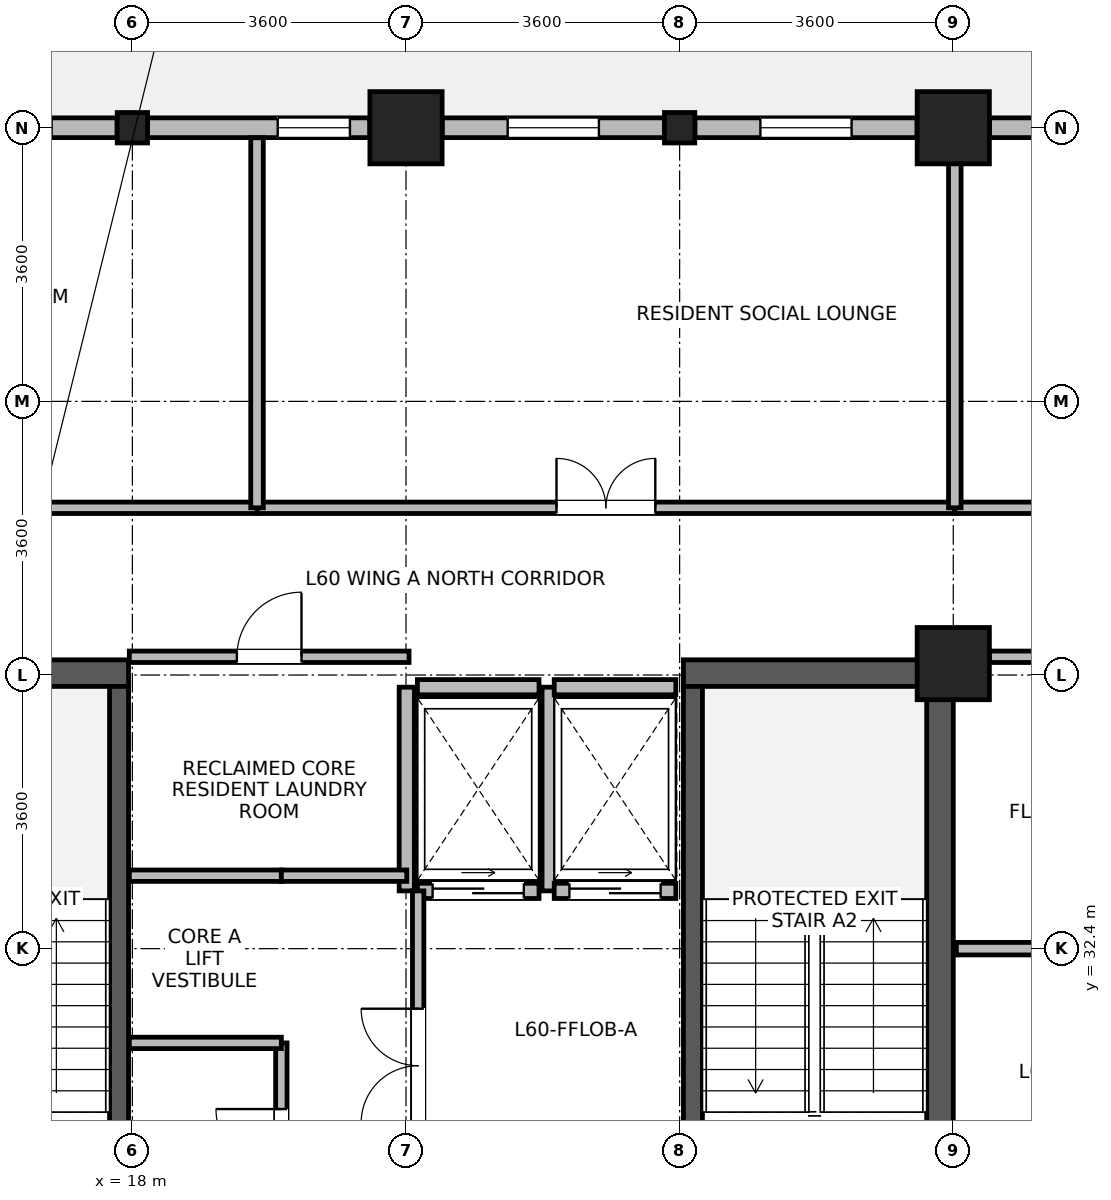
"""IFC4 building model, lengths in metres.
Left out: names, types, materials, properties, quantities, classifications, styles, units other than length and angle.
Written with IfcOpenShell. Run it as: python <this file> out.ifc"""

import sys

from ifc_helpers import new_model, si_unit, direction, frame, frame_2d, origin, origin_2d, place, context, subcontext, project, spatial, rectangle, i_section, extrude, source, transform, mapped, element, fill, save


model = new_model("IFC4")
c1 = context("Model", 3, precision=1e-05, world=origin(), true_north=direction((0.0, 1.0)))
c2 = subcontext(c1, "Body", "Model", "MODEL_VIEW")
j1 = project(units=[si_unit("LENGTHUNIT", "METRE"), si_unit("PLANEANGLEUNIT", "RADIAN")], contexts=[c1])
p1 = place(None, origin())
s1 = spatial("IfcSite", under=j1, at=p1, CompositionType="ELEMENT")
p2 = place(p1, origin())
s2 = spatial("IfcBuilding", under=s1, at=p2, CompositionType="ELEMENT")
p3 = place(p2, frame((0.0, 0.0, 235.1)))
s3 = spatial("IfcBuildingStorey", under=s2, at=p3, CompositionType="ELEMENT", Elevation=235.1)
p4 = place(p3, frame((28.625, 28.5, 0.0), z_axis=(0.0, 0.0, 1.0), x_axis=(0.0, 1.0, 0.0)))
e1 = element("IfcWall", 1, at=p4, inside=s3, PredefinedType="SHEAR", context=c2, shape_type="SweptSolid", body=[
    extrude(rectangle(XDim=7.7, YDim=0.35, at=frame_2d((3.85, 0.0))), origin(), (0.0, 0.0, 1.0), 3.44),
])
for number, where, z_axis, x_axis in (
    (2, (14.75, 36.025, 0.0), (0.0, 0.0, 1.0), (1.0, 0.0, 0.0)),
    (3, (25.25, 36.025, 0.0), (0.0, 0.0, 1.0), (1.0, 0.0, 0.0)),
):
    element("IfcWall", number, at=place(p3, frame(where, z_axis=z_axis, x_axis=x_axis)), inside=s3, PredefinedType="SHEAR", context=c2, shape_type="SweptSolid", body=[
        extrude(rectangle(XDim=3.2, YDim=0.35, at=frame_2d((1.6, 0.0))), origin(), (0.0, 0.0, 1.0), 3.44),
    ])
p5 = place(p3, frame((17.825, 28.85, 0.0), z_axis=(0.0, 0.0, 1.0), x_axis=(0.0, 1.0, 0.0)))
e4 = element("IfcWall", 4, at=p5, inside=s3, PredefinedType="SHEAR", context=c2, shape_type="SweptSolid", body=[
    extrude(rectangle(XDim=7.0, YDim=0.25, at=frame_2d((3.5, 0.0))), origin(), (0.0, 0.0, 1.0), 3.44),
])
p6 = place(p5, frame((0.15, 0.0, 0.0)))
e5 = element("IfcOpeningElement", 5, at=p6, cuts=e4, PredefinedType="OPENING", context=c2, shape_type="SweptSolid", body=[
    extrude(rectangle(XDim=1.1, YDim=2.08, at=frame_2d((0.55, 1.04))), frame((0.0, 0.135, 0.0), z_axis=(0.0, -1.0, 0.0), x_axis=(1.0, 0.0, 0.0)), (0.0, 0.0, 1.0), 0.27),
])
p7 = place(p3, frame((25.375, 28.85, 0.0), z_axis=(0.0, 0.0, 1.0), x_axis=(0.0, 1.0, 0.0)))
e6 = element("IfcWall", 6, at=p7, inside=s3, PredefinedType="SHEAR", context=c2, shape_type="SweptSolid", body=[
    extrude(rectangle(XDim=7.0, YDim=0.25, at=frame_2d((3.5, 0.0))), origin(), (0.0, 0.0, 1.0), 3.44),
])
p8 = place(p7, frame((0.15, 0.0, 0.0)))
e7 = element("IfcOpeningElement", 7, at=p8, cuts=e6, PredefinedType="OPENING", context=c2, shape_type="SweptSolid", body=[
    extrude(rectangle(XDim=1.1, YDim=2.08, at=frame_2d((0.55, 1.04))), frame((0.0, 0.135, 0.0), z_axis=(0.0, -1.0, 0.0), x_axis=(1.0, 0.0, 0.0)), (0.0, 0.0, 1.0), 0.27),
])
m1 = source(origin(), c2, "Body", "SweptSolid", [
    extrude(rectangle(XDim=0.95, YDim=0.95, at=origin_2d()), origin(), (0.0, 0.0, 1.0), 3.7),
])
for number, where, z_axis, x_axis in (
    (8, (21.6, 43.2, 0.0), (0.0, 0.0, 1.0), (1.0, 0.0, 0.0)),
    (9, (28.8, 36.15, 0.0), (0.0, 0.0, 1.0), (1.0, 0.0, 0.0)),
    (10, (28.8, 43.2, 0.0), (0.0, 0.0, 1.0), (1.0, 0.0, 0.0)),
):
    element("IfcColumn", number, at=place(p3, frame(where, z_axis=z_axis, x_axis=x_axis)), inside=s3, PredefinedType="COLUMN", context=c2, shape_type="MappedRepresentation", body=[
        mapped(m1, transform((0.0, 0.0, 0.0), x_axis=(1.0, 0.0, 0.0), y_axis=(0.0, 1.0, 0.0), z_axis=(0.0, 0.0, 1.0), scale=1.0)),
    ])
m2 = source(origin(), c2, "Body", "SweptSolid", [
    extrude(i_section(OverallWidth=0.399, OverallDepth=0.4, WebThickness=0.017, FlangeThickness=0.023, FilletRadius=0.015, at=origin_2d()), origin(), (0.0, 0.0, 1.0), 3.7),
])
for number, where, z_axis, x_axis in (
    (11, (18.0, 43.2, 0.0), (0.0, 0.0, 1.0), (1.0, 0.0, 0.0)),
    (12, (25.2, 43.2, 0.0), (0.0, 0.0, 1.0), (1.0, 0.0, 0.0)),
):
    element("IfcColumn", number, at=place(p3, frame(where, z_axis=z_axis, x_axis=x_axis)), inside=s3, PredefinedType="COLUMN", context=c2, shape_type="MappedRepresentation", body=[
        mapped(m2, transform((0.0, 0.0, 0.0), x_axis=(1.0, 0.0, 0.0), y_axis=(0.0, 1.0, 0.0), z_axis=(0.0, 0.0, 1.0), scale=1.0)),
    ])
p9 = place(p3, frame((29.276, 43.2, 0.0), z_axis=(0.0, 0.0, 1.0), x_axis=(1.0, 0.0, 0.0)))
e13 = element("IfcWall", 13, at=p9, inside=s3, PredefinedType="STANDARD", context=c2, shape_type="SweptSolid", body=[
    extrude(rectangle(XDim=2.924, YDim=0.26, at=frame_2d((1.462, 0.0))), origin(), (0.0, 0.0, 1.0), 3.02),
])
p10 = place(p9, frame((0.862, 0.0, 0.85)))
e14 = element("IfcOpeningElement", 14, at=p10, cuts=e13, PredefinedType="OPENING", context=c2, shape_type="SweptSolid", body=[
    extrude(rectangle(XDim=1.2, YDim=1.75, at=frame_2d((0.6, 0.875))), frame((0.0, 0.14, 0.0), z_axis=(0.0, -1.0, 0.0), x_axis=(1.0, 0.0, 0.0)), (0.0, 0.0, 1.0), 0.28),
])
p11 = place(p3, frame((25.4, 43.2, 0.0), z_axis=(0.0, 0.0, 1.0), x_axis=(1.0, 0.0, 0.0)))
e15 = element("IfcWall", 15, at=p11, inside=s3, PredefinedType="STANDARD", context=c2, shape_type="SweptSolid", body=[
    extrude(rectangle(XDim=2.924, YDim=0.26, at=frame_2d((1.462, 0.0))), origin(), (0.0, 0.0, 1.0), 3.02),
])
p12 = place(p11, frame((0.862, 0.0, 0.85)))
e16 = element("IfcOpeningElement", 16, at=p12, cuts=e15, PredefinedType="OPENING", context=c2, shape_type="SweptSolid", body=[
    extrude(rectangle(XDim=1.2, YDim=1.75, at=frame_2d((0.6, 0.875))), frame((0.0, 0.14, 0.0), z_axis=(0.0, -1.0, 0.0), x_axis=(1.0, 0.0, 0.0)), (0.0, 0.0, 1.0), 0.28),
])
p13 = place(p3, frame((22.076, 43.2, 0.0), z_axis=(0.0, 0.0, 1.0), x_axis=(1.0, 0.0, 0.0)))
e17 = element("IfcWall", 17, at=p13, inside=s3, PredefinedType="STANDARD", context=c2, shape_type="SweptSolid", body=[
    extrude(rectangle(XDim=2.924, YDim=0.26, at=frame_2d((1.462, 0.0))), origin(), (0.0, 0.0, 1.0), 3.02),
])
p14 = place(p13, frame((0.862, 0.0, 0.85)))
e18 = element("IfcOpeningElement", 18, at=p14, cuts=e17, PredefinedType="OPENING", context=c2, shape_type="SweptSolid", body=[
    extrude(rectangle(XDim=1.2, YDim=1.75, at=frame_2d((0.6, 0.875))), frame((0.0, 0.14, 0.0), z_axis=(0.0, -1.0, 0.0), x_axis=(1.0, 0.0, 0.0)), (0.0, 0.0, 1.0), 0.28),
])
p15 = place(p3, frame((18.2, 43.2, 0.0), z_axis=(0.0, 0.0, 1.0), x_axis=(1.0, 0.0, 0.0)))
e19 = element("IfcWall", 19, at=p15, inside=s3, PredefinedType="STANDARD", context=c2, shape_type="SweptSolid", body=[
    extrude(rectangle(XDim=2.924, YDim=0.26, at=frame_2d((1.462, 0.0))), origin(), (0.0, 0.0, 1.0), 3.02),
])
p16 = place(p15, frame((1.712, 0.0, 0.85)))
e20 = element("IfcOpeningElement", 20, at=p16, cuts=e19, PredefinedType="OPENING", context=c2, shape_type="SweptSolid", body=[
    extrude(rectangle(XDim=0.95, YDim=1.75, at=frame_2d((0.475, 0.875))), frame((0.0, 0.14, 0.0), z_axis=(0.0, -1.0, 0.0), x_axis=(1.0, 0.0, 0.0)), (0.0, 0.0, 1.0), 0.28),
])
p17 = place(p3, frame((14.876, 43.2, 0.0), z_axis=(0.0, 0.0, 1.0), x_axis=(1.0, 0.0, 0.0)))
e21 = element("IfcWall", 21, at=p17, inside=s3, PredefinedType="STANDARD", context=c2, shape_type="SweptSolid", body=[
    extrude(rectangle(XDim=2.924, YDim=0.26, at=frame_2d((1.462, 0.0))), origin(), (0.0, 0.0, 1.0), 3.02),
])
p18 = place(p17, frame((0.862, 0.0, 0.85)))
e22 = element("IfcOpeningElement", 22, at=p18, cuts=e21, PredefinedType="OPENING", context=c2, shape_type="SweptSolid", body=[
    extrude(rectangle(XDim=1.2, YDim=1.75, at=frame_2d((0.6, 0.875))), frame((0.0, 0.14, 0.0), z_axis=(0.0, -1.0, 0.0), x_axis=(1.0, 0.0, 0.0)), (0.0, 0.0, 1.0), 0.28),
])
p19 = place(p3, frame((21.75, 33.16, 0.0), z_axis=(0.0, 0.0, 1.0), x_axis=(1.0, 0.0, 0.0)))
e23 = element("IfcWall", 23, at=p19, inside=s3, PredefinedType="PARTITIONING", context=c2, shape_type="SweptSolid", body=[
    extrude(rectangle(XDim=1.6, YDim=0.2, at=frame_2d((0.8, 0.0))), origin(), (0.0, 0.0, 1.0), 3.42),
])
p20 = place(p19, frame((0.2, 0.0, 0.0)))
e24 = element("IfcOpeningElement", 24, at=p20, cuts=e23, PredefinedType="OPENING", context=c2, shape_type="SweptSolid", body=[
    extrude(rectangle(XDim=1.2, YDim=2.12, at=frame_2d((0.6, 1.06))), frame((0.0, 0.11, 0.0), z_axis=(0.0, -1.0, 0.0), x_axis=(1.0, 0.0, 0.0)), (0.0, 0.0, 1.0), 0.22),
])
p21 = place(p3, frame((21.75, 35.84, 0.0), z_axis=(0.0, 0.0, 1.0), x_axis=(1.0, 0.0, 0.0)))
e25 = element("IfcWall", 25, at=p21, inside=s3, PredefinedType="PARTITIONING", context=c2, shape_type="SweptSolid", body=[
    extrude(rectangle(XDim=1.6, YDim=0.2, at=frame_2d((0.8, 0.0))), origin(), (0.0, 0.0, 1.0), 2.52),
])
for number, where, z_axis, x_axis in (
    (26, (21.61, 33.16, 0.0), (0.0, 0.0, 1.0), (0.0, 1.0, 0.0)),
    (27, (23.49, 33.16, 0.0), (0.0, 0.0, 1.0), (0.0, 1.0, 0.0)),
):
    element("IfcWall", number, at=place(p3, frame(where, z_axis=z_axis, x_axis=x_axis)), inside=s3, PredefinedType="PARTITIONING", context=c2, shape_type="SweptSolid", body=[
        extrude(rectangle(XDim=2.68, YDim=0.2, at=frame_2d((1.34, 0.0))), origin(), (0.0, 0.0, 1.0), 3.42),
    ])
p22 = place(p3, frame((23.55, 33.16, 0.0), z_axis=(0.0, 0.0, 1.0), x_axis=(1.0, 0.0, 0.0)))
e28 = element("IfcWall", 28, at=p22, inside=s3, PredefinedType="PARTITIONING", context=c2, shape_type="SweptSolid", body=[
    extrude(rectangle(XDim=1.6, YDim=0.2, at=frame_2d((0.8, 0.0))), origin(), (0.0, 0.0, 1.0), 3.42),
])
p23 = place(p22, frame((0.2, 0.0, 0.0)))
e29 = element("IfcOpeningElement", 29, at=p23, cuts=e28, PredefinedType="OPENING", context=c2, shape_type="SweptSolid", body=[
    extrude(rectangle(XDim=1.2, YDim=2.12, at=frame_2d((0.6, 1.06))), frame((0.0, 0.11, 0.0), z_axis=(0.0, -1.0, 0.0), x_axis=(1.0, 0.0, 0.0)), (0.0, 0.0, 1.0), 0.22),
])
p24 = place(p3, frame((23.55, 35.84, 0.0), z_axis=(0.0, 0.0, 1.0), x_axis=(1.0, 0.0, 0.0)))
e30 = element("IfcWall", 30, at=p24, inside=s3, PredefinedType="PARTITIONING", context=c2, shape_type="SweptSolid", body=[
    extrude(rectangle(XDim=1.6, YDim=0.2, at=frame_2d((0.8, 0.0))), origin(), (0.0, 0.0, 1.0), 2.52),
])
p25 = place(p3, frame((19.64, 38.2, 0.0), z_axis=(0.0, 0.0, 1.0), x_axis=(1.0, 0.0, 0.0)))
e31 = element("IfcWall", 31, at=p25, inside=s3, PredefinedType="PARTITIONING", context=c2, shape_type="SweptSolid", body=[
    extrude(rectangle(XDim=9.18, YDim=0.15, at=frame_2d((4.59, 0.0))), origin(), (0.0, 0.0, 1.0), 3.42),
])
p26 = place(p25, frame((3.94, 0.0, 0.0)))
e32 = element("IfcOpeningElement", 32, at=p26, cuts=e31, PredefinedType="OPENING", context=c2, shape_type="SweptSolid", body=[
    extrude(rectangle(XDim=1.3, YDim=2.12, at=frame_2d((0.65, 1.06))), frame((0.0, 0.085, 0.0), z_axis=(0.0, -1.0, 0.0), x_axis=(1.0, 0.0, 0.0)), (0.0, 0.0, 1.0), 0.17),
])
p27 = place(p3, frame((28.82, 38.2, 0.0), z_axis=(0.0, 0.0, 1.0), x_axis=(1.0, 0.0, 0.0)))
e33 = element("IfcWall", 33, at=p27, inside=s3, PredefinedType="PARTITIONING", context=c2, shape_type="SweptSolid", body=[
    extrude(rectangle(XDim=8.42, YDim=0.15, at=frame_2d((4.21, 0.0))), origin(), (0.0, 0.0, 1.0), 3.42),
])
p28 = place(p27, frame((3.76, 0.0, 0.0)))
e34 = element("IfcOpeningElement", 34, at=p28, cuts=e33, PredefinedType="OPENING", context=c2, shape_type="SweptSolid", body=[
    extrude(rectangle(XDim=0.9, YDim=2.08, at=frame_2d((0.45, 1.04))), frame((0.0, 0.085, 0.0), z_axis=(0.0, -1.0, 0.0), x_axis=(1.0, 0.0, 0.0)), (0.0, 0.0, 1.0), 0.17),
])
p29 = place(p3, frame((12.64, 38.2, 0.0), z_axis=(0.0, 0.0, 1.0), x_axis=(1.0, 0.0, 0.0)))
e35 = element("IfcWall", 35, at=p29, inside=s3, PredefinedType="PARTITIONING", context=c2, shape_type="SweptSolid", body=[
    extrude(rectangle(XDim=7.0, YDim=0.15, at=frame_2d((3.5, 0.0))), origin(), (0.0, 0.0, 1.0), 3.42),
])
p30 = place(p29, frame((2.85, 0.0, 0.0)))
e36 = element("IfcOpeningElement", 36, at=p30, cuts=e35, PredefinedType="OPENING", context=c2, shape_type="SweptSolid", body=[
    extrude(rectangle(XDim=1.3, YDim=2.12, at=frame_2d((0.65, 1.06))), frame((0.0, 0.085, 0.0), z_axis=(0.0, -1.0, 0.0), x_axis=(1.0, 0.0, 0.0)), (0.0, 0.0, 1.0), 0.17),
])
p31 = place(p3, frame((29.275, 36.24, 0.0), z_axis=(0.0, 0.0, 1.0), x_axis=(1.0, 0.0, 0.0)))
e37 = element("IfcWall", 37, at=p31, inside=s3, PredefinedType="PARTITIONING", context=c2, shape_type="SweptSolid", body=[
    extrude(rectangle(XDim=4.085, YDim=0.15, at=frame_2d((2.042, 0.0))), origin(), (0.0, 0.0, 1.0), 2.87),
])
p32 = place(p31, frame((1.393, 0.0, 0.0)))
e38 = element("IfcOpeningElement", 38, at=p32, cuts=e37, PredefinedType="OPENING", context=c2, shape_type="SweptSolid", body=[
    extrude(rectangle(XDim=1.3, YDim=2.12, at=frame_2d((0.65, 1.06))), frame((0.0, 0.085, 0.0), z_axis=(0.0, -1.0, 0.0), x_axis=(1.0, 0.0, 0.0)), (0.0, 0.0, 1.0), 0.17),
])
p33 = place(p3, frame((17.96, 36.24, 0.0), z_axis=(0.0, 0.0, 1.0), x_axis=(1.0, 0.0, 0.0)))
e39 = element("IfcWall", 39, at=p33, inside=s3, PredefinedType="PARTITIONING", context=c2, shape_type="SweptSolid", body=[
    extrude(rectangle(XDim=3.68, YDim=0.15, at=frame_2d((1.84, 0.0))), origin(), (0.0, 0.0, 1.0), 2.52),
])
p34 = place(p33, frame((1.415, 0.0, 0.0)))
e40 = element("IfcOpeningElement", 40, at=p34, cuts=e39, PredefinedType="OPENING", context=c2, shape_type="SweptSolid", body=[
    extrude(rectangle(XDim=0.85, YDim=2.04, at=frame_2d((0.425, 1.02))), frame((0.0, 0.085, 0.0), z_axis=(0.0, -1.0, 0.0), x_axis=(1.0, 0.0, 0.0)), (0.0, 0.0, 1.0), 0.17),
])
p35 = place(p3, frame((19.96, 28.56, 0.0), z_axis=(0.0, 0.0, 1.0), x_axis=(0.0, 1.0, 0.0)))
e41 = element("IfcWall", 41, at=p35, inside=s3, PredefinedType="PARTITIONING", context=c2, shape_type="SweptSolid", body=[
    extrude(rectangle(XDim=2.6, YDim=0.15, at=frame_2d((1.3, 0.0))), origin(), (0.0, 0.0, 1.0), 3.42),
])
p36 = place(p35, frame((0.87, 0.0, 0.0)))
e42 = element("IfcOpeningElement", 42, at=p36, cuts=e41, PredefinedType="OPENING", context=c2, shape_type="SweptSolid", body=[
    extrude(rectangle(XDim=0.86, YDim=2.02, at=frame_2d((0.43, 1.01))), frame((0.0, 0.085, 0.0), z_axis=(0.0, -1.0, 0.0), x_axis=(1.0, 0.0, 0.0)), (0.0, 0.0, 1.0), 0.17),
])
for number, where, z_axis, x_axis in (
    (43, (17.96, 31.16, 0.0), (0.0, 0.0, 1.0), (1.0, 0.0, 0.0)),
    (44, (17.96, 33.36, 0.0), (0.0, 0.0, 1.0), (1.0, 0.0, 0.0)),
):
    element("IfcWall", number, at=place(p3, frame(where, z_axis=z_axis, x_axis=x_axis)), inside=s3, PredefinedType="PARTITIONING", context=c2, shape_type="SweptSolid", body=[
        extrude(rectangle(XDim=2.0, YDim=0.15, at=frame_2d((1.0, 0.0))), origin(), (0.0, 0.0, 1.0), 3.42),
    ])
p37 = place(p3, frame((19.96, 33.36, 0.0), z_axis=(0.0, 0.0, 1.0), x_axis=(1.0, 0.0, 0.0)))
e45 = element("IfcWall", 45, at=p37, inside=s3, PredefinedType="PARTITIONING", context=c2, shape_type="SweptSolid", body=[
    extrude(rectangle(XDim=1.65, YDim=0.15, at=frame_2d((0.825, 0.0))), origin(), (0.0, 0.0, 1.0), 3.42),
])
p38 = place(p3, frame((19.64, 38.2, 0.0), z_axis=(0.0, 0.0, 1.0), x_axis=(0.0, 1.0, 0.0)))
e46 = element("IfcWall", 46, at=p38, inside=s3, PredefinedType="PARTITIONING", context=c2, shape_type="SweptSolid", body=[
    extrude(rectangle(XDim=4.868, YDim=0.165, at=frame_2d((2.434, 0.0))), origin(), (0.0, 0.0, 1.0), 3.42),
])
p39 = place(p3, frame((28.82, 38.2, 0.0), z_axis=(0.0, 0.0, 1.0), x_axis=(0.0, 1.0, 0.0)))
e47 = element("IfcWall", 47, at=p39, inside=s3, PredefinedType="PARTITIONING", context=c2, shape_type="SweptSolid", body=[
    extrude(rectangle(XDim=4.868, YDim=0.165, at=frame_2d((2.434, 0.0))), origin(), (0.0, 0.0, 1.0), 2.97),
])
p40 = place(p3, frame((21.76, 28.56, 0.0), z_axis=(0.0, 0.0, 1.0), x_axis=(0.0, 1.0, 0.0)))
e48 = element("IfcWall", 48, at=p40, inside=s3, PredefinedType="PARTITIONING", context=c2, shape_type="SweptSolid", body=[
    extrude(rectangle(XDim=4.6, YDim=0.15, at=frame_2d((2.3, 0.0))), origin(), (0.0, 0.0, 1.0), 3.42),
])
p41 = place(p40, frame((1.55, 0.0, 0.0)))
e49 = element("IfcOpeningElement", 49, at=p41, cuts=e48, PredefinedType="OPENING", context=c2, shape_type="SweptSolid", body=[
    extrude(rectangle(XDim=1.5, YDim=2.1, at=frame_2d((0.75, 1.05))), frame((0.0, 0.085, 0.0), z_axis=(0.0, -1.0, 0.0), x_axis=(1.0, 0.0, 0.0)), (0.0, 0.0, 1.0), 0.17),
])
p42 = place(p3, frame((28.84, 32.4, 0.0), z_axis=(0.0, 0.0, 1.0), x_axis=(1.0, 0.0, 0.0)))
e50 = element("IfcWall", 50, at=p42, inside=s3, PredefinedType="PARTITIONING", context=c2, shape_type="SweptSolid", body=[
    extrude(rectangle(XDim=4.52, YDim=0.165, at=frame_2d((2.26, 0.0))), origin(), (0.0, 0.0, 1.0), 3.42),
])
p43 = place(p12, origin())
e51 = element("IfcWindow", 51, at=p43, inside=s3, PartitioningType="SINGLE_PANEL", PredefinedType="WINDOW", context=c2, shape_type="SweptSolid", body=[
    extrude(rectangle(XDim=1.2, YDim=1.75, at=frame_2d((0.6, 0.875))), frame((0.0, 0.03, 0.0), z_axis=(0.0, -1.0, 0.0), x_axis=(1.0, 0.0, 0.0)), (0.0, 0.0, 1.0), 0.06),
])
fill(e16, e51)
p44 = place(p14, origin())
e52 = element("IfcWindow", 52, at=p44, inside=s3, PartitioningType="SINGLE_PANEL", PredefinedType="WINDOW", context=c2, shape_type="SweptSolid", body=[
    extrude(rectangle(XDim=1.2, YDim=1.75, at=frame_2d((0.6, 0.875))), frame((0.0, 0.03, 0.0), z_axis=(0.0, -1.0, 0.0), x_axis=(1.0, 0.0, 0.0)), (0.0, 0.0, 1.0), 0.06),
])
fill(e18, e52)
p45 = place(p16, origin())
e53 = element("IfcWindow", 53, at=p45, inside=s3, PartitioningType="SINGLE_PANEL", PredefinedType="WINDOW", context=c2, shape_type="SweptSolid", body=[
    extrude(rectangle(XDim=0.95, YDim=1.75, at=frame_2d((0.475, 0.875))), frame((0.0, 0.03, 0.0), z_axis=(0.0, -1.0, 0.0), x_axis=(1.0, 0.0, 0.0)), (0.0, 0.0, 1.0), 0.06),
])
fill(e20, e53)
p46 = place(p20, origin())
e54 = element("IfcDoor", 54, at=p46, inside=s3, OperationType="SLIDING_TO_RIGHT", PredefinedType="DOOR", context=c2, shape_type="SweptSolid", body=[
    extrude(rectangle(XDim=1.2, YDim=2.12, at=frame_2d((0.6, 1.06))), frame((0.0, 0.025, 0.0), z_axis=(0.0, -1.0, 0.0), x_axis=(1.0, 0.0, 0.0)), (0.0, 0.0, 1.0), 0.05),
])
fill(e24, e54)
p47 = place(p23, origin())
e55 = element("IfcDoor", 55, at=p47, inside=s3, OperationType="SLIDING_TO_RIGHT", PredefinedType="DOOR", context=c2, shape_type="SweptSolid", body=[
    extrude(rectangle(XDim=1.2, YDim=2.12, at=frame_2d((0.6, 1.06))), frame((0.0, 0.025, 0.0), z_axis=(0.0, -1.0, 0.0), x_axis=(1.0, 0.0, 0.0)), (0.0, 0.0, 1.0), 0.05),
])
fill(e29, e55)
p48 = place(p26, origin())
e56 = element("IfcDoor", 56, at=p48, inside=s3, OperationType="DOUBLE_DOOR_SINGLE_SWING", PredefinedType="DOOR", context=c2, shape_type="SweptSolid", body=[
    extrude(rectangle(XDim=1.3, YDim=2.12, at=frame_2d((0.65, 1.06))), frame((0.0, 0.025, 0.0), z_axis=(0.0, -1.0, 0.0), x_axis=(1.0, 0.0, 0.0)), (0.0, 0.0, 1.0), 0.05),
])
fill(e32, e56)
p49 = place(p34, origin())
e57 = element("IfcDoor", 57, at=p49, inside=s3, OperationType="SINGLE_SWING_RIGHT", PredefinedType="DOOR", context=c2, shape_type="SweptSolid", body=[
    extrude(rectangle(XDim=0.85, YDim=2.04, at=frame_2d((0.425, 1.02))), frame((0.0, 0.025, 0.0), z_axis=(0.0, -1.0, 0.0), x_axis=(1.0, 0.0, 0.0)), (0.0, 0.0, 1.0), 0.05),
])
fill(e40, e57)
p50 = place(p36, origin())
e58 = element("IfcDoor", 58, at=p50, inside=s3, OperationType="SINGLE_SWING_RIGHT", PredefinedType="DOOR", context=c2, shape_type="SweptSolid", body=[
    extrude(rectangle(XDim=0.86, YDim=2.02, at=frame_2d((0.43, 1.01))), frame((0.0, 0.025, 0.0), z_axis=(0.0, -1.0, 0.0), x_axis=(1.0, 0.0, 0.0)), (0.0, 0.0, 1.0), 0.05),
])
fill(e42, e58)
p51 = place(p41, origin())
e59 = element("IfcDoor", 59, at=p51, inside=s3, OperationType="DOUBLE_DOOR_SINGLE_SWING", PredefinedType="DOOR", context=c2, shape_type="SweptSolid", body=[
    extrude(rectangle(XDim=1.5, YDim=2.1, at=frame_2d((0.75, 1.05))), frame((0.0, 0.025, 0.0), z_axis=(0.0, -1.0, 0.0), x_axis=(1.0, 0.0, 0.0)), (0.0, 0.0, 1.0), 0.05),
])
fill(e49, e59)
save(model, sys.argv[1])
